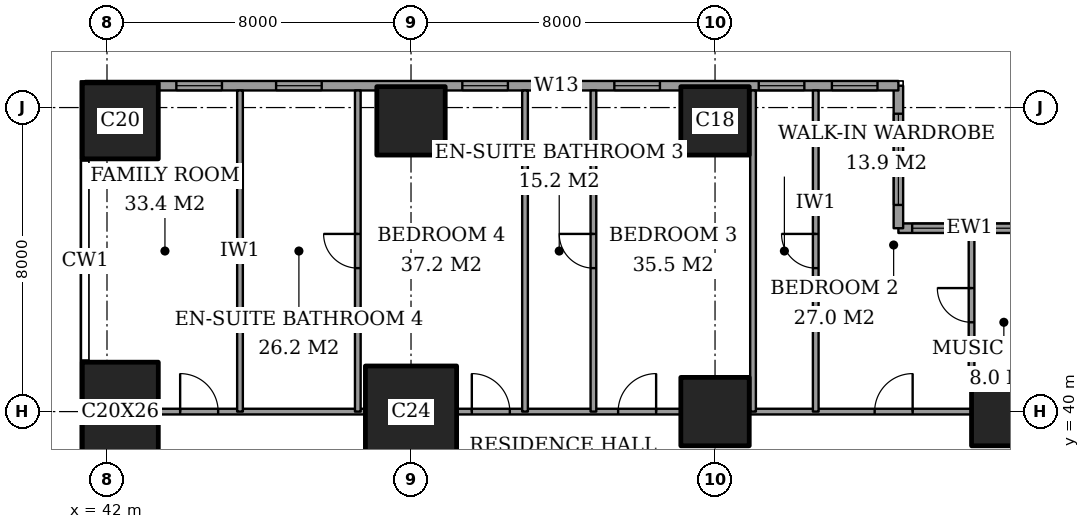
"""IFC4 building model, lengths in metres.
Left out: names, types, materials, properties, quantities, classifications, styles, units other than length and angle.
Written with IfcOpenShell. Run it as: python <this file> out.ifc"""

import sys

from ifc_helpers import new_model, si_unit, direction, frame, frame_2d, origin, origin_2d, place, context, subcontext, project, spatial, rectangle, extrude, element, fill, save


model = new_model("IFC4")
c1 = context("Model", 3, precision=1e-05, world=origin(), true_north=direction((0.0, 1.0)))
c2 = subcontext(c1, "Body", "Model", "MODEL_VIEW")
j1 = project(units=[si_unit("LENGTHUNIT", "METRE"), si_unit("PLANEANGLEUNIT", "RADIAN")], contexts=[c1])
p1 = place(None, origin())
s1 = spatial("IfcSite", under=j1, at=p1, CompositionType="ELEMENT")
p2 = place(p1, origin())
s2 = spatial("IfcBuilding", under=s1, at=p2, CompositionType="ELEMENT")
p3 = place(p2, frame((0.0, 0.0, 221.8)))
s3 = spatial("IfcBuildingStorey", under=s2, at=p3, CompositionType="ELEMENT", Elevation=221.8)
p4 = place(p3, frame((42.35, 40.0, 0.0), z_axis=(0.0, 0.0, 1.0), x_axis=(1.0, 0.0, 0.0)))
e1 = element("IfcColumn", 1, at=p4, inside=s3, PredefinedType="COLUMN", context=c2, shape_type="SweptSolid", body=[
    extrude(rectangle(XDim=2.0, YDim=2.6, at=origin_2d()), origin(), (0.0, 0.0, 1.0), 3.6),
])
p5 = place(p3, frame((42.35, 47.65, 0.0), z_axis=(0.0, 0.0, 1.0), x_axis=(1.0, 0.0, 0.0)))
e2 = element("IfcColumn", 2, at=p5, inside=s3, PredefinedType="COLUMN", context=c2, shape_type="SweptSolid", body=[
    extrude(rectangle(XDim=2.0, YDim=2.0, at=origin_2d()), origin(), (0.0, 0.0, 1.0), 3.6),
])
p6 = place(p3, frame((50.0, 40.0, 0.0), z_axis=(0.0, 0.0, 1.0), x_axis=(1.0, 0.0, 0.0)))
e3 = element("IfcColumn", 3, at=p6, inside=s3, PredefinedType="COLUMN", context=c2, shape_type="SweptSolid", body=[
    extrude(rectangle(XDim=2.4, YDim=2.4, at=origin_2d()), origin(), (0.0, 0.0, 1.0), 3.6),
])
for number, where, z_axis, x_axis in (
    (4, (50.0, 47.65, 0.0), (0.0, 0.0, 1.0), (1.0, 0.0, 0.0)),
    (5, (58.0, 40.0, 0.0), (0.0, 0.0, 1.0), (1.0, 0.0, 0.0)),
    (6, (58.0, 47.65, 0.0), (0.0, 0.0, 1.0), (1.0, 0.0, 0.0)),
    (7, (65.65, 40.0, 0.0), (0.0, 0.0, 1.0), (1.0, 0.0, 0.0)),
):
    element("IfcColumn", number, at=place(p3, frame(where, z_axis=z_axis, x_axis=x_axis)), inside=s3, PredefinedType="COLUMN", context=c2, shape_type="SweptSolid", body=[
        extrude(rectangle(XDim=1.8, YDim=1.8, at=origin_2d()), origin(), (0.0, 0.0, 1.0), 3.6),
    ])
p7 = place(p3, frame((66.575, 44.825, 0.0), z_axis=(0.0, 0.0, 1.0), x_axis=(-1.0, 0.0, 0.0)))
e8 = element("IfcWall", 8, at=p7, inside=s3, PredefinedType="SOLIDWALL", context=c2, shape_type="SweptSolid", body=[
    extrude(rectangle(XDim=3.75, YDim=0.25, at=frame_2d((1.875, 0.0))), origin(), (0.0, 0.0, 1.0), 3.6),
])
p8 = place(p7, frame((0.45, 0.0, 0.2)))
e9 = element("IfcOpeningElement", 9, at=p8, cuts=e8, PredefinedType="OPENING", context=c2, shape_type="SweptSolid", body=[
    extrude(rectangle(XDim=1.2, YDim=2.4, at=frame_2d((0.6, 1.2))), frame((0.0, 0.135, 0.0), z_axis=(0.0, -1.0, 0.0), x_axis=(1.0, 0.0, 0.0)), (0.0, 0.0, 1.0), 0.27),
])
p9 = place(p7, frame((2.188, 0.0, 0.2)))
e10 = element("IfcOpeningElement", 10, at=p9, cuts=e8, PredefinedType="OPENING", context=c2, shape_type="SweptSolid", body=[
    extrude(rectangle(XDim=1.2, YDim=2.4, at=frame_2d((0.6, 1.2))), frame((0.0, 0.135, 0.0), z_axis=(0.0, -1.0, 0.0), x_axis=(1.0, 0.0, 0.0)), (0.0, 0.0, 1.0), 0.27),
])
p10 = place(p3, frame((62.825, 44.825, 0.0), z_axis=(0.0, 0.0, 1.0), x_axis=(0.0, 1.0, 0.0)))
e11 = element("IfcWall", 11, at=p10, inside=s3, PredefinedType="SOLIDWALL", context=c2, shape_type="SweptSolid", body=[
    extrude(rectangle(XDim=3.75, YDim=0.25, at=frame_2d((1.875, 0.0))), origin(), (0.0, 0.0, 1.0), 3.6),
])
p11 = place(p10, frame((0.613, 0.0, 0.2)))
e12 = element("IfcOpeningElement", 12, at=p11, cuts=e11, PredefinedType="OPENING", context=c2, shape_type="SweptSolid", body=[
    extrude(rectangle(XDim=2.4, YDim=2.4, at=frame_2d((1.2, 1.2))), frame((0.0, 0.135, 0.0), z_axis=(0.0, -1.0, 0.0), x_axis=(1.0, 0.0, 0.0)), (0.0, 0.0, 1.0), 0.27),
])
p12 = place(p3, frame((62.825, 48.575, 0.0), z_axis=(0.0, 0.0, 1.0), x_axis=(-1.0, 0.0, 0.0)))
e13 = element("IfcWall", 13, at=p12, inside=s3, PredefinedType="SOLIDWALL", context=c2, shape_type="SweptSolid", body=[
    extrude(rectangle(XDim=21.4, YDim=0.25, at=frame_2d((10.7, 0.0))), origin(), (0.0, 0.0, 1.0), 3.6),
])
p13 = place(p12, frame((0.55, 0.0, 0.2)))
e14 = element("IfcOpeningElement", 14, at=p13, cuts=e13, PredefinedType="OPENING", context=c2, shape_type="SweptSolid", body=[
    extrude(rectangle(XDim=1.2, YDim=2.4, at=frame_2d((0.6, 1.2))), frame((0.0, 0.135, 0.0), z_axis=(0.0, -1.0, 0.0), x_axis=(1.0, 0.0, 0.0)), (0.0, 0.0, 1.0), 0.27),
])
p14 = place(p12, frame((2.475, 0.0, 0.2)))
e15 = element("IfcOpeningElement", 15, at=p14, cuts=e13, PredefinedType="OPENING", context=c2, shape_type="SweptSolid", body=[
    extrude(rectangle(XDim=1.2, YDim=2.4, at=frame_2d((0.6, 1.2))), frame((0.0, 0.135, 0.0), z_axis=(0.0, -1.0, 0.0), x_axis=(1.0, 0.0, 0.0)), (0.0, 0.0, 1.0), 0.27),
])
p15 = place(p12, frame((6.275, 0.0, 0.2)))
e16 = element("IfcOpeningElement", 16, at=p15, cuts=e13, PredefinedType="OPENING", context=c2, shape_type="SweptSolid", body=[
    extrude(rectangle(XDim=1.2, YDim=2.4, at=frame_2d((0.6, 1.2))), frame((0.0, 0.135, 0.0), z_axis=(0.0, -1.0, 0.0), x_axis=(1.0, 0.0, 0.0)), (0.0, 0.0, 1.0), 0.27),
])
p16 = place(p12, frame((8.4, 0.0, 0.2)))
e17 = element("IfcOpeningElement", 17, at=p16, cuts=e13, PredefinedType="OPENING", context=c2, shape_type="SweptSolid", body=[
    extrude(rectangle(XDim=1.2, YDim=2.4, at=frame_2d((0.6, 1.2))), frame((0.0, 0.135, 0.0), z_axis=(0.0, -1.0, 0.0), x_axis=(1.0, 0.0, 0.0)), (0.0, 0.0, 1.0), 0.27),
])
p17 = place(p12, frame((10.275, 0.0, 0.2)))
e18 = element("IfcOpeningElement", 18, at=p17, cuts=e13, PredefinedType="OPENING", context=c2, shape_type="SweptSolid", body=[
    extrude(rectangle(XDim=1.2, YDim=2.4, at=frame_2d((0.6, 1.2))), frame((0.0, 0.135, 0.0), z_axis=(0.0, -1.0, 0.0), x_axis=(1.0, 0.0, 0.0)), (0.0, 0.0, 1.0), 0.27),
])
p18 = place(p12, frame((15.175, 0.0, 0.2)))
e19 = element("IfcOpeningElement", 19, at=p18, cuts=e13, PredefinedType="OPENING", context=c2, shape_type="SweptSolid", body=[
    extrude(rectangle(XDim=1.2, YDim=2.4, at=frame_2d((0.6, 1.2))), frame((0.0, 0.135, 0.0), z_axis=(0.0, -1.0, 0.0), x_axis=(1.0, 0.0, 0.0)), (0.0, 0.0, 1.0), 0.27),
])
p19 = place(p12, frame((17.8, 0.0, 0.2)))
e20 = element("IfcOpeningElement", 20, at=p19, cuts=e13, PredefinedType="OPENING", context=c2, shape_type="SweptSolid", body=[
    extrude(rectangle(XDim=1.2, YDim=2.4, at=frame_2d((0.6, 1.2))), frame((0.0, 0.135, 0.0), z_axis=(0.0, -1.0, 0.0), x_axis=(1.0, 0.0, 0.0)), (0.0, 0.0, 1.0), 0.27),
])
p20 = place(p3, frame((43.35, 40.0, 0.0), z_axis=(0.0, 0.0, 1.0), x_axis=(1.0, 0.0, 0.0)))
e21 = element("IfcWall", 21, at=p20, inside=s3, PredefinedType="PARTITIONING", context=c2, shape_type="SweptSolid", body=[
    extrude(rectangle(XDim=5.45, YDim=0.15, at=frame_2d((2.725, 0.0))), origin(), (0.0, 0.0, 1.0), 3.25),
])
p21 = place(p20, frame((0.575, 0.0, 0.0)))
e22 = element("IfcOpeningElement", 22, at=p21, cuts=e21, PredefinedType="OPENING", context=c2, shape_type="SweptSolid", body=[
    extrude(rectangle(XDim=1.0, YDim=2.1, at=frame_2d((0.5, 1.05))), frame((0.0, 0.085, 0.0), z_axis=(0.0, -1.0, 0.0), x_axis=(1.0, 0.0, 0.0)), (0.0, 0.0, 1.0), 0.17),
])
p22 = place(p3, frame((51.2, 40.0, 0.0), z_axis=(0.0, 0.0, 1.0), x_axis=(1.0, 0.0, 0.0)))
e23 = element("IfcWall", 23, at=p22, inside=s3, PredefinedType="PARTITIONING", context=c2, shape_type="SweptSolid", body=[
    extrude(rectangle(XDim=5.9, YDim=0.15, at=frame_2d((2.95, 0.0))), origin(), (0.0, 0.0, 1.0), 3.25),
])
p23 = place(p22, frame((4.25, 0.0, 0.0)))
e24 = element("IfcOpeningElement", 24, at=p23, cuts=e23, PredefinedType="OPENING", context=c2, shape_type="SweptSolid", body=[
    extrude(rectangle(XDim=1.0, YDim=2.1, at=frame_2d((0.5, 1.05))), frame((0.0, 0.085, 0.0), z_axis=(0.0, -1.0, 0.0), x_axis=(1.0, 0.0, 0.0)), (0.0, 0.0, 1.0), 0.17),
])
p24 = place(p22, frame((0.4, 0.0, 0.0)))
e25 = element("IfcOpeningElement", 25, at=p24, cuts=e23, PredefinedType="OPENING", context=c2, shape_type="SweptSolid", body=[
    extrude(rectangle(XDim=1.0, YDim=2.1, at=frame_2d((0.5, 1.05))), frame((0.0, 0.085, 0.0), z_axis=(0.0, -1.0, 0.0), x_axis=(1.0, 0.0, 0.0)), (0.0, 0.0, 1.0), 0.17),
])
p25 = place(p3, frame((58.9, 40.0, 0.0), z_axis=(0.0, 0.0, 1.0), x_axis=(1.0, 0.0, 0.0)))
e26 = element("IfcWall", 26, at=p25, inside=s3, PredefinedType="PARTITIONING", context=c2, shape_type="SweptSolid", body=[
    extrude(rectangle(XDim=5.85, YDim=0.15, at=frame_2d((2.925, 0.0))), origin(), (0.0, 0.0, 1.0), 3.25),
])
p26 = place(p25, frame((3.3, 0.0, 0.0)))
e27 = element("IfcOpeningElement", 27, at=p26, cuts=e26, PredefinedType="OPENING", context=c2, shape_type="SweptSolid", body=[
    extrude(rectangle(XDim=1.0, YDim=2.1, at=frame_2d((0.5, 1.05))), frame((0.0, 0.085, 0.0), z_axis=(0.0, -1.0, 0.0), x_axis=(1.0, 0.0, 0.0)), (0.0, 0.0, 1.0), 0.17),
])
p27 = place(p3, frame((45.5, 40.0, 0.0), z_axis=(0.0, 0.0, 1.0), x_axis=(0.0, 1.0, 0.0)))
e28 = element("IfcWall", 28, at=p27, inside=s3, PredefinedType="PARTITIONING", context=c2, shape_type="SweptSolid", body=[
    extrude(rectangle(XDim=8.45, YDim=0.15, at=frame_2d((4.225, 0.0))), origin(), (0.0, 0.0, 1.0), 3.25),
])
p28 = place(p3, frame((48.6, 40.0, 0.0), z_axis=(0.0, 0.0, 1.0), x_axis=(0.0, 1.0, 0.0)))
e29 = element("IfcWall", 29, at=p28, inside=s3, PredefinedType="PARTITIONING", context=c2, shape_type="SweptSolid", body=[
    extrude(rectangle(XDim=8.45, YDim=0.15, at=frame_2d((4.225, 0.0))), origin(), (0.0, 0.0, 1.0), 3.25),
])
p29 = place(p28, frame((3.775, 0.0, 0.0)))
e30 = element("IfcOpeningElement", 30, at=p29, cuts=e29, PredefinedType="OPENING", context=c2, shape_type="SweptSolid", body=[
    extrude(rectangle(XDim=0.9, YDim=2.1, at=frame_2d((0.45, 1.05))), frame((0.0, 0.085, 0.0), z_axis=(0.0, -1.0, 0.0), x_axis=(1.0, 0.0, 0.0)), (0.0, 0.0, 1.0), 0.17),
])
p30 = place(p3, frame((53.0, 40.0, 0.0), z_axis=(0.0, 0.0, 1.0), x_axis=(0.0, 1.0, 0.0)))
e31 = element("IfcWall", 31, at=p30, inside=s3, PredefinedType="PARTITIONING", context=c2, shape_type="SweptSolid", body=[
    extrude(rectangle(XDim=8.45, YDim=0.15, at=frame_2d((4.225, 0.0))), origin(), (0.0, 0.0, 1.0), 3.25),
])
p31 = place(p3, frame((54.8, 40.0, 0.0), z_axis=(0.0, 0.0, 1.0), x_axis=(0.0, 1.0, 0.0)))
e32 = element("IfcWall", 32, at=p31, inside=s3, PredefinedType="PARTITIONING", context=c2, shape_type="SweptSolid", body=[
    extrude(rectangle(XDim=8.45, YDim=0.15, at=frame_2d((4.225, 0.0))), origin(), (0.0, 0.0, 1.0), 3.25),
])
p32 = place(p31, frame((3.775, 0.0, 0.0)))
e33 = element("IfcOpeningElement", 33, at=p32, cuts=e32, PredefinedType="OPENING", context=c2, shape_type="SweptSolid", body=[
    extrude(rectangle(XDim=0.9, YDim=2.1, at=frame_2d((0.45, 1.05))), frame((0.0, 0.085, 0.0), z_axis=(0.0, -1.0, 0.0), x_axis=(1.0, 0.0, 0.0)), (0.0, 0.0, 1.0), 0.17),
])
p33 = place(p3, frame((59.0, 40.0, 0.0), z_axis=(0.0, 0.0, 1.0), x_axis=(0.0, 1.0, 0.0)))
e34 = element("IfcWall", 34, at=p33, inside=s3, PredefinedType="PARTITIONING", context=c2, shape_type="SweptSolid", body=[
    extrude(rectangle(XDim=8.45, YDim=0.15, at=frame_2d((4.225, 0.0))), origin(), (0.0, 0.0, 1.0), 3.25),
])
p34 = place(p3, frame((60.65, 40.0, 0.0), z_axis=(0.0, 0.0, 1.0), x_axis=(0.0, 1.0, 0.0)))
e35 = element("IfcWall", 35, at=p34, inside=s3, PredefinedType="PARTITIONING", context=c2, shape_type="SweptSolid", body=[
    extrude(rectangle(XDim=8.45, YDim=0.15, at=frame_2d((4.225, 0.0))), origin(), (0.0, 0.0, 1.0), 3.25),
])
p35 = place(p34, frame((3.775, 0.0, 0.0)))
e36 = element("IfcOpeningElement", 36, at=p35, cuts=e35, PredefinedType="OPENING", context=c2, shape_type="SweptSolid", body=[
    extrude(rectangle(XDim=0.9, YDim=2.1, at=frame_2d((0.45, 1.05))), frame((0.0, 0.085, 0.0), z_axis=(0.0, -1.0, 0.0), x_axis=(1.0, 0.0, 0.0)), (0.0, 0.0, 1.0), 0.17),
])
p36 = place(p3, frame((64.75, 40.9, 0.0), z_axis=(0.0, 0.0, 1.0), x_axis=(0.0, 1.0, 0.0)))
e37 = element("IfcWall", 37, at=p36, inside=s3, PredefinedType="PARTITIONING", context=c2, shape_type="SweptSolid", body=[
    extrude(rectangle(XDim=3.8, YDim=0.15, at=frame_2d((1.9, 0.0))), origin(), (0.0, 0.0, 1.0), 3.25),
])
p37 = place(p36, frame((1.45, 0.0, 0.0)))
e38 = element("IfcOpeningElement", 38, at=p37, cuts=e37, PredefinedType="OPENING", context=c2, shape_type="SweptSolid", body=[
    extrude(rectangle(XDim=0.9, YDim=2.1, at=frame_2d((0.45, 1.05))), frame((0.0, 0.085, 0.0), z_axis=(0.0, -1.0, 0.0), x_axis=(1.0, 0.0, 0.0)), (0.0, 0.0, 1.0), 0.17),
])
p38 = place(p8, origin())
e39 = element("IfcWindow", 39, at=p38, inside=s3, PartitioningType="SINGLE_PANEL", PredefinedType="WINDOW", context=c2, shape_type="SweptSolid", body=[
    extrude(rectangle(XDim=1.2, YDim=2.4, at=frame_2d((0.6, 1.2))), frame((0.0, 0.03, 0.0), z_axis=(0.0, -1.0, 0.0), x_axis=(1.0, 0.0, 0.0)), (0.0, 0.0, 1.0), 0.06),
])
fill(e9, e39)
p39 = place(p9, origin())
e40 = element("IfcWindow", 40, at=p39, inside=s3, PartitioningType="SINGLE_PANEL", PredefinedType="WINDOW", context=c2, shape_type="SweptSolid", body=[
    extrude(rectangle(XDim=1.2, YDim=2.4, at=frame_2d((0.6, 1.2))), frame((0.0, 0.03, 0.0), z_axis=(0.0, -1.0, 0.0), x_axis=(1.0, 0.0, 0.0)), (0.0, 0.0, 1.0), 0.06),
])
fill(e10, e40)
p40 = place(p11, origin())
e41 = element("IfcWindow", 41, at=p40, inside=s3, PartitioningType="SINGLE_PANEL", PredefinedType="WINDOW", context=c2, shape_type="SweptSolid", body=[
    extrude(rectangle(XDim=2.4, YDim=2.4, at=frame_2d((1.2, 1.2))), frame((0.0, 0.03, 0.0), z_axis=(0.0, -1.0, 0.0), x_axis=(1.0, 0.0, 0.0)), (0.0, 0.0, 1.0), 0.06),
])
fill(e12, e41)
p41 = place(p13, origin())
e42 = element("IfcWindow", 42, at=p41, inside=s3, PartitioningType="SINGLE_PANEL", PredefinedType="WINDOW", context=c2, shape_type="SweptSolid", body=[
    extrude(rectangle(XDim=1.2, YDim=2.4, at=frame_2d((0.6, 1.2))), frame((0.0, 0.03, 0.0), z_axis=(0.0, -1.0, 0.0), x_axis=(1.0, 0.0, 0.0)), (0.0, 0.0, 1.0), 0.06),
])
fill(e14, e42)
p42 = place(p14, origin())
e43 = element("IfcWindow", 43, at=p42, inside=s3, PartitioningType="SINGLE_PANEL", PredefinedType="WINDOW", context=c2, shape_type="SweptSolid", body=[
    extrude(rectangle(XDim=1.2, YDim=2.4, at=frame_2d((0.6, 1.2))), frame((0.0, 0.03, 0.0), z_axis=(0.0, -1.0, 0.0), x_axis=(1.0, 0.0, 0.0)), (0.0, 0.0, 1.0), 0.06),
])
fill(e15, e43)
p43 = place(p15, origin())
e44 = element("IfcWindow", 44, at=p43, inside=s3, PartitioningType="SINGLE_PANEL", PredefinedType="WINDOW", context=c2, shape_type="SweptSolid", body=[
    extrude(rectangle(XDim=1.2, YDim=2.4, at=frame_2d((0.6, 1.2))), frame((0.0, 0.03, 0.0), z_axis=(0.0, -1.0, 0.0), x_axis=(1.0, 0.0, 0.0)), (0.0, 0.0, 1.0), 0.06),
])
fill(e16, e44)
p44 = place(p16, origin())
e45 = element("IfcWindow", 45, at=p44, inside=s3, PartitioningType="SINGLE_PANEL", PredefinedType="WINDOW", context=c2, shape_type="SweptSolid", body=[
    extrude(rectangle(XDim=1.2, YDim=2.4, at=frame_2d((0.6, 1.2))), frame((0.0, 0.03, 0.0), z_axis=(0.0, -1.0, 0.0), x_axis=(1.0, 0.0, 0.0)), (0.0, 0.0, 1.0), 0.06),
])
fill(e17, e45)
p45 = place(p17, origin())
e46 = element("IfcWindow", 46, at=p45, inside=s3, PartitioningType="SINGLE_PANEL", PredefinedType="WINDOW", context=c2, shape_type="SweptSolid", body=[
    extrude(rectangle(XDim=1.2, YDim=2.4, at=frame_2d((0.6, 1.2))), frame((0.0, 0.03, 0.0), z_axis=(0.0, -1.0, 0.0), x_axis=(1.0, 0.0, 0.0)), (0.0, 0.0, 1.0), 0.06),
])
fill(e18, e46)
p46 = place(p18, origin())
e47 = element("IfcWindow", 47, at=p46, inside=s3, PartitioningType="SINGLE_PANEL", PredefinedType="WINDOW", context=c2, shape_type="SweptSolid", body=[
    extrude(rectangle(XDim=1.2, YDim=2.4, at=frame_2d((0.6, 1.2))), frame((0.0, 0.03, 0.0), z_axis=(0.0, -1.0, 0.0), x_axis=(1.0, 0.0, 0.0)), (0.0, 0.0, 1.0), 0.06),
])
fill(e19, e47)
p47 = place(p19, origin())
e48 = element("IfcWindow", 48, at=p47, inside=s3, PartitioningType="SINGLE_PANEL", PredefinedType="WINDOW", context=c2, shape_type="SweptSolid", body=[
    extrude(rectangle(XDim=1.2, YDim=2.4, at=frame_2d((0.6, 1.2))), frame((0.0, 0.03, 0.0), z_axis=(0.0, -1.0, 0.0), x_axis=(1.0, 0.0, 0.0)), (0.0, 0.0, 1.0), 0.06),
])
fill(e20, e48)
p48 = place(p37, origin())
e49 = element("IfcDoor", 49, at=p48, inside=s3, OperationType="SINGLE_SWING_LEFT", PredefinedType="DOOR", context=c2, shape_type="SweptSolid", body=[
    extrude(rectangle(XDim=0.9, YDim=2.1, at=frame_2d((0.45, 1.05))), frame((0.0, 0.025, 0.0), z_axis=(0.0, -1.0, 0.0), x_axis=(1.0, 0.0, 0.0)), (0.0, 0.0, 1.0), 0.05),
])
fill(e38, e49)
p49 = place(p26, origin())
e50 = element("IfcDoor", 50, at=p49, inside=s3, OperationType="SINGLE_SWING_LEFT", PredefinedType="DOOR", context=c2, shape_type="SweptSolid", body=[
    extrude(rectangle(XDim=1.0, YDim=2.1, at=frame_2d((0.5, 1.05))), frame((0.0, 0.025, 0.0), z_axis=(0.0, -1.0, 0.0), x_axis=(1.0, 0.0, 0.0)), (0.0, 0.0, 1.0), 0.05),
])
fill(e27, e50)
p50 = place(p35, origin())
e51 = element("IfcDoor", 51, at=p50, inside=s3, OperationType="SINGLE_SWING_LEFT", PredefinedType="DOOR", context=c2, shape_type="SweptSolid", body=[
    extrude(rectangle(XDim=0.9, YDim=2.1, at=frame_2d((0.45, 1.05))), frame((0.0, 0.025, 0.0), z_axis=(0.0, -1.0, 0.0), x_axis=(1.0, 0.0, 0.0)), (0.0, 0.0, 1.0), 0.05),
])
fill(e36, e51)
p51 = place(p23, origin())
e52 = element("IfcDoor", 52, at=p51, inside=s3, OperationType="SINGLE_SWING_LEFT", PredefinedType="DOOR", context=c2, shape_type="SweptSolid", body=[
    extrude(rectangle(XDim=1.0, YDim=2.1, at=frame_2d((0.5, 1.05))), frame((0.0, 0.025, 0.0), z_axis=(0.0, -1.0, 0.0), x_axis=(1.0, 0.0, 0.0)), (0.0, 0.0, 1.0), 0.05),
])
fill(e24, e52)
p52 = place(p32, origin())
e53 = element("IfcDoor", 53, at=p52, inside=s3, OperationType="SINGLE_SWING_LEFT", PredefinedType="DOOR", context=c2, shape_type="SweptSolid", body=[
    extrude(rectangle(XDim=0.9, YDim=2.1, at=frame_2d((0.45, 1.05))), frame((0.0, 0.025, 0.0), z_axis=(0.0, -1.0, 0.0), x_axis=(1.0, 0.0, 0.0)), (0.0, 0.0, 1.0), 0.05),
])
fill(e33, e53)
p53 = place(p24, origin())
e54 = element("IfcDoor", 54, at=p53, inside=s3, OperationType="SINGLE_SWING_RIGHT", PredefinedType="DOOR", context=c2, shape_type="SweptSolid", body=[
    extrude(rectangle(XDim=1.0, YDim=2.1, at=frame_2d((0.5, 1.05))), frame((0.0, 0.025, 0.0), z_axis=(0.0, -1.0, 0.0), x_axis=(1.0, 0.0, 0.0)), (0.0, 0.0, 1.0), 0.05),
])
fill(e25, e54)
p54 = place(p29, origin())
e55 = element("IfcDoor", 55, at=p54, inside=s3, OperationType="SINGLE_SWING_LEFT", PredefinedType="DOOR", context=c2, shape_type="SweptSolid", body=[
    extrude(rectangle(XDim=0.9, YDim=2.1, at=frame_2d((0.45, 1.05))), frame((0.0, 0.025, 0.0), z_axis=(0.0, -1.0, 0.0), x_axis=(1.0, 0.0, 0.0)), (0.0, 0.0, 1.0), 0.05),
])
fill(e30, e55)
p55 = place(p21, origin())
e56 = element("IfcDoor", 56, at=p55, inside=s3, OperationType="SINGLE_SWING_RIGHT", PredefinedType="DOOR", context=c2, shape_type="SweptSolid", body=[
    extrude(rectangle(XDim=1.0, YDim=2.1, at=frame_2d((0.5, 1.05))), frame((0.0, 0.025, 0.0), z_axis=(0.0, -1.0, 0.0), x_axis=(1.0, 0.0, 0.0)), (0.0, 0.0, 1.0), 0.05),
])
fill(e22, e56)
save(model, sys.argv[1])
